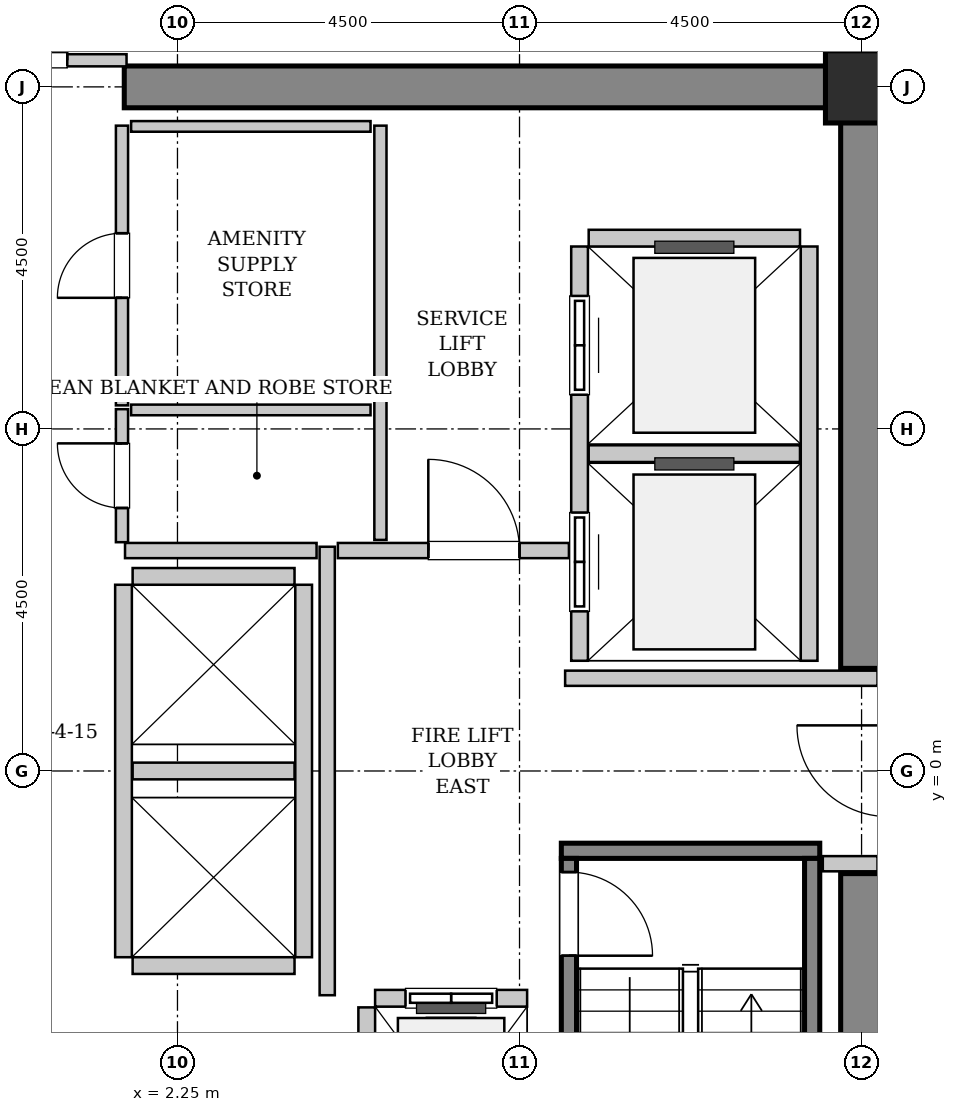
"""IFC4 building model, lengths in metres.
Left out: names, types, materials, properties, quantities, classifications, styles, units other than length and angle.
Written with IfcOpenShell. Run it as: python <this file> out.ifc"""

import sys

from ifc_helpers import new_model, si_unit, direction, frame, frame_2d, origin, origin_2d, place, context, subcontext, project, spatial, rectangle, hollow_rectangle, extrude, source, transform, mapped, element, fill, save


model = new_model("IFC4")
c1 = context("Model", 3, precision=1e-05, world=origin(), true_north=direction((0.0, 1.0)))
c2 = subcontext(c1, "Body", "Model", "MODEL_VIEW")
j1 = project(units=[si_unit("LENGTHUNIT", "METRE"), si_unit("PLANEANGLEUNIT", "RADIAN")], contexts=[c1])
p1 = place(None, origin())
s1 = spatial("IfcSite", under=j1, at=p1, CompositionType="ELEMENT")
p2 = place(p1, origin())
s2 = spatial("IfcBuilding", under=s1, at=p2, CompositionType="ELEMENT")
p3 = place(p2, frame((0.0, 0.0, 183.0)))
s3 = spatial("IfcBuildingStorey", under=s2, at=p3, CompositionType="ELEMENT", Elevation=183.0)
m1 = source(origin(), c2, "Body", "SweptSolid", [
    extrude(rectangle(XDim=9.975, YDim=0.55, at=frame_2d((4.987, 0.0))), origin(), (0.0, 0.0, 1.0), 3.8),
])
p4 = place(p3, frame((1.55, 9.0, 0.0), z_axis=(0.0, 0.0, 1.0), x_axis=(1.0, 0.0, 0.0)))
e1 = element("IfcWall", 1, at=p4, inside=s3, PredefinedType="SHEAR", context=c2, shape_type="MappedRepresentation", body=[
    mapped(m1, transform((0.0, 0.0, 0.0), x_axis=(1.0, 0.0, 0.0), y_axis=(0.0, 1.0, 0.0), z_axis=(0.0, 0.0, 1.0), scale=1.0)),
])
m2 = source(origin(), c2, "Body", "SweptSolid", [
    extrude(rectangle(XDim=7.375, YDim=0.55, at=frame_2d((3.688, 0.0))), origin(), (0.0, 0.0, 1.0), 3.8),
])
for number, where, z_axis, x_axis in (
    (2, (11.25, -8.725, 0.0), (0.0, 0.0, 1.0), (0.0, 1.0, 0.0)),
    (3, (11.25, 1.35, 0.0), (0.0, 0.0, 1.0), (0.0, 1.0, 0.0)),
):
    element("IfcWall", number, at=place(p3, frame(where, z_axis=z_axis, x_axis=x_axis)), inside=s3, PredefinedType="SHEAR", context=c2, shape_type="MappedRepresentation", body=[
        mapped(m2, transform((0.0, 0.0, 0.0), x_axis=(1.0, 0.0, 0.0), y_axis=(0.0, 1.0, 0.0), z_axis=(0.0, 0.0, 1.0), scale=1.0)),
    ])
m3 = source(origin(), c2, "Body", "SweptSolid", [
    extrude(hollow_rectangle(XDim=0.95, YDim=0.95, WallThickness=0.045, InnerFilletRadius=0.045, OuterFilletRadius=0.09, at=origin_2d()), origin(), (0.0, 0.0, 1.0), 3.8),
])
p5 = place(p3, frame((11.25, 9.0, 0.0), z_axis=(0.0, 0.0, 1.0), x_axis=(1.0, 0.0, 0.0)))
e4 = element("IfcColumn", 4, at=p5, inside=s3, PredefinedType="COLUMN", context=c2, shape_type="MappedRepresentation", body=[
    mapped(m3, transform((0.0, 0.0, 0.0), x_axis=(1.0, 0.0, 0.0), y_axis=(0.0, 1.0, 0.0), z_axis=(0.0, 0.0, 1.0), scale=1.0)),
])
m4 = source(origin(), c2, "Body", "SweptSolid", [
    extrude(rectangle(XDim=3.4, YDim=0.2, at=frame_2d((1.7, 0.0))), origin(), (0.0, 0.0, 1.0), 3.8),
])
p6 = place(p3, frame((7.3, -1.05, 0.0), z_axis=(0.0, 0.0, 1.0), x_axis=(1.0, 0.0, 0.0)))
e5 = element("IfcWall", 5, at=p6, inside=s3, PredefinedType="SOLIDWALL", context=c2, shape_type="MappedRepresentation", body=[
    mapped(m4, transform((0.0, 0.0, 0.0), x_axis=(1.0, 0.0, 0.0), y_axis=(0.0, 1.0, 0.0), z_axis=(0.0, 0.0, 1.0), scale=1.0)),
])
m5 = source(origin(), c2, "Body", "SweptSolid", [
    extrude(rectangle(XDim=7.1, YDim=0.2, at=frame_2d((3.55, 0.0))), origin(), (0.0, 0.0, 1.0), 3.8),
])
p7 = place(p3, frame((7.4, -1.15, 0.0), z_axis=(0.0, 0.0, 1.0), x_axis=(0.0, -1.0, 0.0)))
e6 = element("IfcWall", 6, at=p7, inside=s3, PredefinedType="SOLIDWALL", context=c2, shape_type="MappedRepresentation", body=[
    mapped(m5, transform((0.0, 0.0, 0.0), x_axis=(1.0, 0.0, 0.0), y_axis=(0.0, 1.0, 0.0), z_axis=(0.0, 0.0, 1.0), scale=1.0)),
])
p8 = place(p7, frame((0.18, 0.0, 0.0)))
e7 = element("IfcOpeningElement", 7, at=p8, cuts=e6, PredefinedType="OPENING", context=c2, shape_type="SweptSolid", body=[
    extrude(rectangle(XDim=1.1, YDim=2.15, at=frame_2d((0.55, 1.075))), frame((0.0, 0.11, 0.0), z_axis=(0.0, -1.0, 0.0), x_axis=(1.0, 0.0, 0.0)), (0.0, 0.0, 1.0), 0.22),
])
p9 = place(p3, frame((10.6, -1.15, 0.0), z_axis=(0.0, 0.0, 1.0), x_axis=(0.0, -1.0, 0.0)))
e8 = element("IfcWall", 8, at=p9, inside=s3, PredefinedType="SOLIDWALL", context=c2, shape_type="MappedRepresentation", body=[
    mapped(m5, transform((0.0, 0.0, 0.0), x_axis=(1.0, 0.0, 0.0), y_axis=(0.0, 1.0, 0.0), z_axis=(0.0, 0.0, 1.0), scale=1.0)),
])
m6 = source(origin(), c2, "Body", "SweptSolid", [
    extrude(rectangle(XDim=2.0, YDim=0.22, at=frame_2d((1.0, 0.0))), origin(), (0.0, 0.0, 1.0), 3.535),
])
p10 = place(p3, frame((6.85, -2.99, 0.0), z_axis=(0.0, 0.0, 1.0), x_axis=(-1.0, 0.0, 0.0)))
e9 = element("IfcWall", 9, at=p10, inside=s3, PredefinedType="SOLIDWALL", context=c2, shape_type="MappedRepresentation", body=[
    mapped(m6, transform((0.0, 0.0, 0.0), x_axis=(1.0, 0.0, 0.0), y_axis=(0.0, 1.0, 0.0), z_axis=(0.0, 0.0, 1.0), scale=1.0)),
])
p11 = place(p10, frame((0.4, 0.0, 0.0)))
e10 = element("IfcOpeningElement", 10, at=p11, cuts=e9, PredefinedType="OPENING", context=c2, shape_type="SweptSolid", body=[
    extrude(rectangle(XDim=1.2, YDim=2.2, at=frame_2d((0.6, 1.1))), frame((0.0, 0.12, 0.0), z_axis=(0.0, -1.0, 0.0), x_axis=(1.0, 0.0, 0.0)), (0.0, 0.0, 1.0), 0.24),
])
m7 = source(origin(), c2, "Body", "SweptSolid", [
    extrude(rectangle(XDim=2.68, YDim=0.22, at=frame_2d((1.34, 0.0))), origin(), (0.0, 0.0, 1.0), 3.535),
])
p12 = place(p3, frame((4.74, -3.11, 0.0), z_axis=(0.0, 0.0, 1.0), x_axis=(0.0, -1.0, 0.0)))
e11 = element("IfcWall", 11, at=p12, inside=s3, PredefinedType="SOLIDWALL", context=c2, shape_type="MappedRepresentation", body=[
    mapped(m7, transform((0.0, 0.0, 0.0), x_axis=(1.0, 0.0, 0.0), y_axis=(0.0, 1.0, 0.0), z_axis=(0.0, 0.0, 1.0), scale=1.0)),
])
m8 = source(origin(), c2, "Body", "SweptSolid", [
    extrude(rectangle(XDim=5.45, YDim=0.22, at=frame_2d((2.725, 0.0))), origin(), (0.0, 0.0, 1.0), 3.535),
])
p13 = place(p3, frame((7.54, 6.9, 0.0), z_axis=(0.0, 0.0, 1.0), x_axis=(0.0, -1.0, 0.0)))
e12 = element("IfcWall", 12, at=p13, inside=s3, PredefinedType="SOLIDWALL", context=c2, shape_type="MappedRepresentation", body=[
    mapped(m8, transform((0.0, 0.0, 0.0), x_axis=(1.0, 0.0, 0.0), y_axis=(0.0, 1.0, 0.0), z_axis=(0.0, 0.0, 1.0), scale=1.0)),
])
p14 = place(p13, frame((3.5, 0.0, 0.0)))
e13 = element("IfcOpeningElement", 13, at=p14, cuts=e12, PredefinedType="OPENING", context=c2, shape_type="SweptSolid", body=[
    extrude(rectangle(XDim=1.3, YDim=2.3, at=frame_2d((0.65, 1.15))), frame((0.0, 0.12, 0.0), z_axis=(0.0, -1.0, 0.0), x_axis=(1.0, 0.0, 0.0)), (0.0, 0.0, 1.0), 0.24),
])
p15 = place(p13, frame((0.65, 0.0, 0.0)))
e14 = element("IfcOpeningElement", 14, at=p15, cuts=e12, PredefinedType="OPENING", context=c2, shape_type="SweptSolid", body=[
    extrude(rectangle(XDim=1.3, YDim=2.3, at=frame_2d((0.65, 1.15))), frame((0.0, 0.12, 0.0), z_axis=(0.0, -1.0, 0.0), x_axis=(1.0, 0.0, 0.0)), (0.0, 0.0, 1.0), 0.24),
])
p16 = place(p3, frame((10.56, 1.45, 0.0), z_axis=(0.0, 0.0, 1.0), x_axis=(0.0, 1.0, 0.0)))
e15 = element("IfcWall", 15, at=p16, inside=s3, PredefinedType="SOLIDWALL", context=c2, shape_type="MappedRepresentation", body=[
    mapped(m8, transform((0.0, 0.0, 0.0), x_axis=(1.0, 0.0, 0.0), y_axis=(0.0, 1.0, 0.0), z_axis=(0.0, 0.0, 1.0), scale=1.0)),
])
m9 = source(origin(), c2, "Body", "SweptSolid", [
    extrude(rectangle(XDim=2.78, YDim=0.22, at=frame_2d((1.39, 0.0))), origin(), (0.0, 0.0, 1.0), 3.535),
])
for number, where, z_axis, x_axis in (
    (16, (7.66, 4.175, 0.0), (0.0, 0.0, 1.0), (1.0, 0.0, 0.0)),
    (17, (10.44, 7.01, 0.0), (0.0, 0.0, 1.0), (-1.0, 0.0, 0.0)),
):
    element("IfcWall", number, at=place(p3, frame(where, z_axis=z_axis, x_axis=x_axis)), inside=s3, PredefinedType="SOLIDWALL", context=c2, shape_type="MappedRepresentation", body=[
        mapped(m9, transform((0.0, 0.0, 0.0), x_axis=(1.0, 0.0, 0.0), y_axis=(0.0, 1.0, 0.0), z_axis=(0.0, 0.0, 1.0), scale=1.0)),
    ])
m10 = source(origin(), c2, "Body", "SweptSolid", [
    extrude(rectangle(XDim=4.9, YDim=0.22, at=frame_2d((2.45, 0.0))), origin(), (0.0, 0.0, 1.0), 3.535),
])
for number, where, z_axis, x_axis in (
    (18, (1.54, 2.45, 0.0), (0.0, 0.0, 1.0), (0.0, -1.0, 0.0)),
    (19, (3.91, -2.45, 0.0), (0.0, 0.0, 1.0), (0.0, 1.0, 0.0)),
):
    element("IfcWall", number, at=place(p3, frame(where, z_axis=z_axis, x_axis=x_axis)), inside=s3, PredefinedType="SOLIDWALL", context=c2, shape_type="MappedRepresentation", body=[
        mapped(m10, transform((0.0, 0.0, 0.0), x_axis=(1.0, 0.0, 0.0), y_axis=(0.0, 1.0, 0.0), z_axis=(0.0, 0.0, 1.0), scale=1.0)),
    ])
m11 = source(origin(), c2, "Body", "SweptSolid", [
    extrude(rectangle(XDim=2.13, YDim=0.22, at=frame_2d((1.065, 0.0))), origin(), (0.0, 0.0, 1.0), 3.535),
])
for number, where, z_axis, x_axis in (
    (20, (1.66, -2.56, 0.0), (0.0, 0.0, 1.0), (1.0, 0.0, 0.0)),
    (21, (1.66, 0.0, 0.0), (0.0, 0.0, 1.0), (1.0, 0.0, 0.0)),
    (22, (3.79, 2.56, 0.0), (0.0, 0.0, 1.0), (-1.0, 0.0, 0.0)),
):
    element("IfcWall", number, at=place(p3, frame(where, z_axis=z_axis, x_axis=x_axis)), inside=s3, PredefinedType="SOLIDWALL", context=c2, shape_type="MappedRepresentation", body=[
        mapped(m11, transform((0.0, 0.0, 0.0), x_axis=(1.0, 0.0, 0.0), y_axis=(0.0, 1.0, 0.0), z_axis=(0.0, 0.0, 1.0), scale=1.0)),
    ])
m12 = source(origin(), c2, "Body", "SweptSolid", [
    extrude(rectangle(XDim=5.9, YDim=0.2, at=frame_2d((2.95, 0.0))), origin(), (0.0, 0.0, 1.0), 3.535),
])
p17 = place(p3, frame((4.22, -2.95, 0.0), z_axis=(0.0, 0.0, 1.0), x_axis=(0.0, 1.0, 0.0)))
e23 = element("IfcWall", 23, at=p17, inside=s3, PredefinedType="PARTITIONING", context=c2, shape_type="MappedRepresentation", body=[
    mapped(m12, transform((0.0, 0.0, 0.0), x_axis=(1.0, 0.0, 0.0), y_axis=(0.0, 1.0, 0.0), z_axis=(0.0, 0.0, 1.0), scale=1.0)),
])
m13 = source(origin(), c2, "Body", "SweptSolid", [
    extrude(rectangle(XDim=2.52, YDim=0.2, at=frame_2d((1.26, 0.0))), origin(), (0.0, 0.0, 1.0), 3.535),
])
p18 = place(p3, frame((1.56, 2.9, 0.0), z_axis=(0.0, 0.0, 1.0), x_axis=(1.0, 0.0, 0.0)))
e24 = element("IfcWall", 24, at=p18, inside=s3, PredefinedType="PARTITIONING", context=c2, shape_type="MappedRepresentation", body=[
    mapped(m13, transform((0.0, 0.0, 0.0), x_axis=(1.0, 0.0, 0.0), y_axis=(0.0, 1.0, 0.0), z_axis=(0.0, 0.0, 1.0), scale=1.0)),
])
m14 = source(origin(), c2, "Body", "SweptSolid", [
    extrude(rectangle(XDim=3.04, YDim=0.2, at=frame_2d((1.52, 0.0))), origin(), (0.0, 0.0, 1.0), 3.535),
])
p19 = place(p3, frame((4.36, 2.9, 0.0), z_axis=(0.0, 0.0, 1.0), x_axis=(1.0, 0.0, 0.0)))
e25 = element("IfcWall", 25, at=p19, inside=s3, PredefinedType="PARTITIONING", context=c2, shape_type="MappedRepresentation", body=[
    mapped(m14, transform((0.0, 0.0, 0.0), x_axis=(1.0, 0.0, 0.0), y_axis=(0.0, 1.0, 0.0), z_axis=(0.0, 0.0, 1.0), scale=1.0)),
])
p20 = place(p19, frame((1.19, 0.0, 0.0)))
e26 = element("IfcOpeningElement", 26, at=p20, cuts=e25, PredefinedType="OPENING", context=c2, shape_type="SweptSolid", body=[
    extrude(rectangle(XDim=1.2, YDim=2.15, at=frame_2d((0.6, 1.075))), frame((0.0, 0.11, 0.0), z_axis=(0.0, -1.0, 0.0), x_axis=(1.0, 0.0, 0.0)), (0.0, 0.0, 1.0), 0.22),
])
m15 = source(origin(), c2, "Body", "SweptSolid", [
    extrude(rectangle(XDim=4.11, YDim=0.2, at=frame_2d((2.055, 0.0))), origin(), (0.0, 0.0, 1.0), 3.535),
])
p21 = place(p3, frame((7.35, 1.22, 0.0), z_axis=(0.0, 0.0, 1.0), x_axis=(1.0, 0.0, 0.0)))
e27 = element("IfcWall", 27, at=p21, inside=s3, PredefinedType="PARTITIONING", context=c2, shape_type="MappedRepresentation", body=[
    mapped(m15, transform((0.0, 0.0, 0.0), x_axis=(1.0, 0.0, 0.0), y_axis=(0.0, 1.0, 0.0), z_axis=(0.0, 0.0, 1.0), scale=1.0)),
])
m16 = source(origin(), c2, "Body", "SweptSolid", [
    extrude(rectangle(XDim=0.72, YDim=0.2, at=frame_2d((0.36, 0.0))), origin(), (0.0, 0.0, 1.0), 3.535),
])
p22 = place(p3, frame((10.74, -1.22, 0.0), z_axis=(0.0, 0.0, 1.0), x_axis=(1.0, 0.0, 0.0)))
e28 = element("IfcWall", 28, at=p22, inside=s3, PredefinedType="PARTITIONING", context=c2, shape_type="MappedRepresentation", body=[
    mapped(m16, transform((0.0, 0.0, 0.0), x_axis=(1.0, 0.0, 0.0), y_axis=(0.0, 1.0, 0.0), z_axis=(0.0, 0.0, 1.0), scale=1.0)),
])
m17 = source(origin(), c2, "Body", "SweptSolid", [
    extrude(rectangle(XDim=3.16, YDim=0.16, at=frame_2d((1.58, 0.0))), origin(), (0.0, 0.0, 1.0), 2.425),
])
p23 = place(p3, frame((-1.58, 9.35, 0.0), z_axis=(0.0, 0.0, 1.0), x_axis=(1.0, 0.0, 0.0)))
e29 = element("IfcWall", 29, at=p23, inside=s3, PredefinedType="PARTITIONING", context=c2, shape_type="MappedRepresentation", body=[
    mapped(m17, transform((0.0, 0.0, 0.0), x_axis=(1.0, 0.0, 0.0), y_axis=(0.0, 1.0, 0.0), z_axis=(0.0, 0.0, 1.0), scale=1.0)),
])
p24 = place(p23, frame((0.78, 0.0, 0.0)))
e30 = element("IfcOpeningElement", 30, at=p24, cuts=e29, PredefinedType="OPENING", context=c2, shape_type="SweptSolid", body=[
    extrude(rectangle(XDim=1.6, YDim=2.3, at=frame_2d((0.8, 1.15))), frame((0.0, 0.09, 0.0), z_axis=(0.0, -1.0, 0.0), x_axis=(1.0, 0.0, 0.0)), (0.0, 0.0, 1.0), 0.18),
])
m18 = source(origin(), c2, "Body", "SweptSolid", [
    extrude(rectangle(XDim=5.45, YDim=0.16, at=frame_2d((2.725, 0.0))), origin(), (0.0, 0.0, 1.0), 3.535),
])
p25 = place(p3, frame((4.92, 3.04, 0.0), z_axis=(0.0, 0.0, 1.0), x_axis=(0.0, 1.0, 0.0)))
e31 = element("IfcWall", 31, at=p25, inside=s3, PredefinedType="PARTITIONING", context=c2, shape_type="MappedRepresentation", body=[
    mapped(m18, transform((0.0, 0.0, 0.0), x_axis=(1.0, 0.0, 0.0), y_axis=(0.0, 1.0, 0.0), z_axis=(0.0, 0.0, 1.0), scale=1.0)),
])
m19 = source(origin(), c2, "Body", "SweptSolid", [
    extrude(rectangle(XDim=1.75, YDim=0.16, at=frame_2d((0.875, 0.0))), origin(), (0.0, 0.0, 1.0), 3.535),
])
p26 = place(p3, frame((1.52, 3.01, 0.0), z_axis=(0.0, 0.0, 1.0), x_axis=(0.0, 1.0, 0.0)))
e32 = element("IfcWall", 32, at=p26, inside=s3, PredefinedType="PARTITIONING", context=c2, shape_type="MappedRepresentation", body=[
    mapped(m19, transform((0.0, 0.0, 0.0), x_axis=(1.0, 0.0, 0.0), y_axis=(0.0, 1.0, 0.0), z_axis=(0.0, 0.0, 1.0), scale=1.0)),
])
p27 = place(p26, frame((0.45, 0.0, 0.0)))
e33 = element("IfcOpeningElement", 33, at=p27, cuts=e32, PredefinedType="OPENING", context=c2, shape_type="SweptSolid", body=[
    extrude(rectangle(XDim=0.85, YDim=2.1, at=frame_2d((0.425, 1.05))), frame((0.0, 0.09, 0.0), z_axis=(0.0, -1.0, 0.0), x_axis=(1.0, 0.0, 0.0)), (0.0, 0.0, 1.0), 0.18),
])
m20 = source(origin(), c2, "Body", "SweptSolid", [
    extrude(rectangle(XDim=3.15, YDim=0.14, at=frame_2d((1.575, 0.0))), origin(), (0.0, 0.0, 1.0), 3.535),
])
p28 = place(p3, frame((1.64, 4.75, 0.0), z_axis=(0.0, 0.0, 1.0), x_axis=(1.0, 0.0, 0.0)))
e34 = element("IfcWall", 34, at=p28, inside=s3, PredefinedType="PARTITIONING", context=c2, shape_type="MappedRepresentation", body=[
    mapped(m20, transform((0.0, 0.0, 0.0), x_axis=(1.0, 0.0, 0.0), y_axis=(0.0, 1.0, 0.0), z_axis=(0.0, 0.0, 1.0), scale=1.0)),
])
m21 = source(origin(), c2, "Body", "SweptSolid", [
    extrude(rectangle(XDim=3.68, YDim=0.16, at=frame_2d((1.84, 0.0))), origin(), (0.0, 0.0, 1.0), 3.535),
])
p29 = place(p3, frame((1.52, 4.81, 0.0), z_axis=(0.0, 0.0, 1.0), x_axis=(0.0, 1.0, 0.0)))
e35 = element("IfcWall", 35, at=p29, inside=s3, PredefinedType="PARTITIONING", context=c2, shape_type="MappedRepresentation", body=[
    mapped(m21, transform((0.0, 0.0, 0.0), x_axis=(1.0, 0.0, 0.0), y_axis=(0.0, 1.0, 0.0), z_axis=(0.0, 0.0, 1.0), scale=1.0)),
])
p30 = place(p29, frame((1.415, 0.0, 0.0)))
e36 = element("IfcOpeningElement", 36, at=p30, cuts=e35, PredefinedType="OPENING", context=c2, shape_type="SweptSolid", body=[
    extrude(rectangle(XDim=0.85, YDim=2.1, at=frame_2d((0.425, 1.05))), frame((0.0, 0.09, 0.0), z_axis=(0.0, -1.0, 0.0), x_axis=(1.0, 0.0, 0.0)), (0.0, 0.0, 1.0), 0.18),
])
p31 = place(p3, frame((1.64, 8.48, 0.0), z_axis=(0.0, 0.0, 1.0), x_axis=(1.0, 0.0, 0.0)))
e37 = element("IfcWall", 37, at=p31, inside=s3, PredefinedType="PARTITIONING", context=c2, shape_type="MappedRepresentation", body=[
    mapped(m20, transform((0.0, 0.0, 0.0), x_axis=(1.0, 0.0, 0.0), y_axis=(0.0, 1.0, 0.0), z_axis=(0.0, 0.0, 1.0), scale=1.0)),
])
m22 = source(origin(), c2, "Body", "SweptSolid", [
    extrude(rectangle(XDim=1.1, YDim=2.15, at=frame_2d((0.55, 1.075))), frame((0.0, 0.025, 0.0), z_axis=(0.0, -1.0, 0.0), x_axis=(1.0, 0.0, 0.0)), (0.0, 0.0, 1.0), 0.05),
])
p32 = place(p8, origin())
e38 = element("IfcDoor", 38, at=p32, inside=s3, OperationType="SINGLE_SWING_RIGHT", PredefinedType="DOOR", context=c2, shape_type="MappedRepresentation", body=[
    mapped(m22, transform((0.0, 0.0, 0.0), x_axis=(1.0, 0.0, 0.0), y_axis=(0.0, 1.0, 0.0), z_axis=(0.0, 0.0, 1.0), scale=1.0)),
])
fill(e7, e38)
m23 = source(origin(), c2, "Body", "SweptSolid", [
    extrude(rectangle(XDim=1.2, YDim=2.2, at=frame_2d((0.6, 1.1))), frame((0.0, 0.025, 0.0), z_axis=(0.0, -1.0, 0.0), x_axis=(1.0, 0.0, 0.0)), (0.0, 0.0, 1.0), 0.05),
])
p33 = place(p11, origin())
e39 = element("IfcDoor", 39, at=p33, inside=s3, OperationType="SLIDING_TO_LEFT", PredefinedType="DOOR", context=c2, shape_type="MappedRepresentation", body=[
    mapped(m23, transform((0.0, 0.0, 0.0), x_axis=(1.0, 0.0, 0.0), y_axis=(0.0, 1.0, 0.0), z_axis=(0.0, 0.0, 1.0), scale=1.0)),
])
fill(e10, e39)
m24 = source(origin(), c2, "Body", "SweptSolid", [
    extrude(rectangle(XDim=1.3, YDim=2.3, at=frame_2d((0.65, 1.15))), frame((0.0, 0.025, 0.0), z_axis=(0.0, -1.0, 0.0), x_axis=(1.0, 0.0, 0.0)), (0.0, 0.0, 1.0), 0.05),
])
p34 = place(p14, origin())
e40 = element("IfcDoor", 40, at=p34, inside=s3, OperationType="SLIDING_TO_RIGHT", PredefinedType="DOOR", context=c2, shape_type="MappedRepresentation", body=[
    mapped(m24, transform((0.0, 0.0, 0.0), x_axis=(1.0, 0.0, 0.0), y_axis=(0.0, 1.0, 0.0), z_axis=(0.0, 0.0, 1.0), scale=1.0)),
])
fill(e13, e40)
p35 = place(p15, origin())
e41 = element("IfcDoor", 41, at=p35, inside=s3, OperationType="SLIDING_TO_RIGHT", PredefinedType="DOOR", context=c2, shape_type="MappedRepresentation", body=[
    mapped(m24, transform((0.0, 0.0, 0.0), x_axis=(1.0, 0.0, 0.0), y_axis=(0.0, 1.0, 0.0), z_axis=(0.0, 0.0, 1.0), scale=1.0)),
])
fill(e14, e41)
m25 = source(origin(), c2, "Body", "SweptSolid", [
    extrude(rectangle(XDim=1.2, YDim=2.15, at=frame_2d((0.6, 1.075))), frame((0.0, 0.025, 0.0), z_axis=(0.0, -1.0, 0.0), x_axis=(1.0, 0.0, 0.0)), (0.0, 0.0, 1.0), 0.05),
])
p36 = place(p20, origin())
e42 = element("IfcDoor", 42, at=p36, inside=s3, OperationType="SINGLE_SWING_LEFT", PredefinedType="DOOR", context=c2, shape_type="MappedRepresentation", body=[
    mapped(m25, transform((0.0, 0.0, 0.0), x_axis=(1.0, 0.0, 0.0), y_axis=(0.0, 1.0, 0.0), z_axis=(0.0, 0.0, 1.0), scale=1.0)),
])
fill(e26, e42)
m26 = source(origin(), c2, "Body", "SweptSolid", [
    extrude(rectangle(XDim=1.6, YDim=2.3, at=frame_2d((0.8, 1.15))), frame((0.0, 0.025, 0.0), z_axis=(0.0, -1.0, 0.0), x_axis=(1.0, 0.0, 0.0)), (0.0, 0.0, 1.0), 0.05),
])
p37 = place(p24, origin())
e43 = element("IfcDoor", 43, at=p37, inside=s3, OperationType="DOUBLE_DOOR_SINGLE_SWING", PredefinedType="DOOR", context=c2, shape_type="MappedRepresentation", body=[
    mapped(m26, transform((0.0, 0.0, 0.0), x_axis=(1.0, 0.0, 0.0), y_axis=(0.0, 1.0, 0.0), z_axis=(0.0, 0.0, 1.0), scale=1.0)),
])
fill(e30, e43)
m27 = source(origin(), c2, "Body", "SweptSolid", [
    extrude(rectangle(XDim=0.85, YDim=2.1, at=frame_2d((0.425, 1.05))), frame((0.0, 0.025, 0.0), z_axis=(0.0, -1.0, 0.0), x_axis=(1.0, 0.0, 0.0)), (0.0, 0.0, 1.0), 0.05),
])
p38 = place(p27, origin())
e44 = element("IfcDoor", 44, at=p38, inside=s3, OperationType="SINGLE_SWING_RIGHT", PredefinedType="DOOR", context=c2, shape_type="MappedRepresentation", body=[
    mapped(m27, transform((0.0, 0.0, 0.0), x_axis=(1.0, 0.0, 0.0), y_axis=(0.0, 1.0, 0.0), z_axis=(0.0, 0.0, 1.0), scale=1.0)),
])
fill(e33, e44)
p39 = place(p30, origin())
e45 = element("IfcDoor", 45, at=p39, inside=s3, OperationType="SINGLE_SWING_LEFT", PredefinedType="DOOR", context=c2, shape_type="MappedRepresentation", body=[
    mapped(m27, transform((0.0, 0.0, 0.0), x_axis=(1.0, 0.0, 0.0), y_axis=(0.0, 1.0, 0.0), z_axis=(0.0, 0.0, 1.0), scale=1.0)),
])
fill(e36, e45)
save(model, sys.argv[1])
